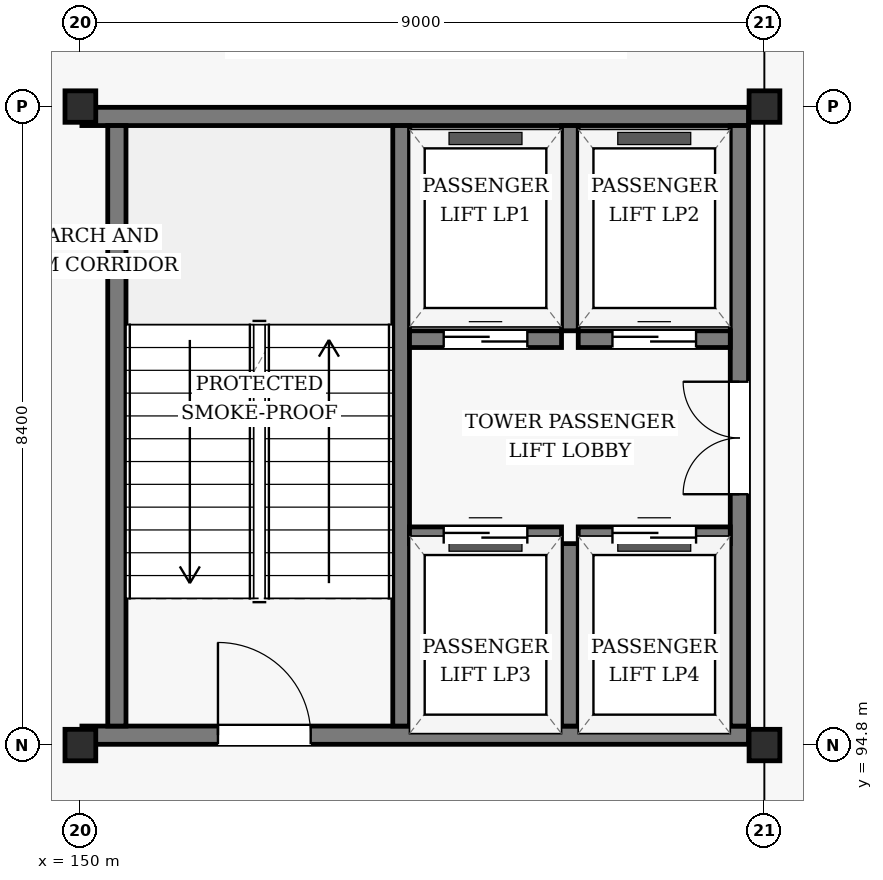
"""IFC4 building model, lengths in metres.
Left out: names, types, materials, properties, quantities, classifications, styles, units other than length and angle.
Written with IfcOpenShell. Run it as: python <this file> out.ifc"""

import sys

from ifc_helpers import new_model, si_unit, direction, frame, frame_2d, origin, origin_2d, place, context, subcontext, project, spatial, rectangle, i_section, extrude, element, fill, save


model = new_model("IFC4")
c1 = context("Model", 3, precision=1e-05, world=origin(), true_north=direction((0.0, 1.0)))
c2 = subcontext(c1, "Body", "Model", "MODEL_VIEW")
j1 = project(units=[si_unit("LENGTHUNIT", "METRE"), si_unit("PLANEANGLEUNIT", "RADIAN")], contexts=[c1])
p1 = place(None, origin())
s1 = spatial("IfcSite", under=j1, at=p1, CompositionType="ELEMENT")
p2 = place(p1, origin())
s2 = spatial("IfcBuilding", under=s1, at=p2, CompositionType="ELEMENT")
p3 = place(p2, frame((0.0, 0.0, 17.1)))
s3 = spatial("IfcBuildingStorey", under=s2, at=p3, CompositionType="ELEMENT", Elevation=17.1)
for number, where, z_axis, x_axis in (
    (1, (150.0, 94.8, 0.0), (0.0, 0.0, 1.0), (1.0, 0.0, 0.0)),
    (2, (150.0, 103.2, 0.0), (0.0, 0.0, 1.0), (1.0, 0.0, 0.0)),
    (3, (159.0, 94.8, 0.0), (0.0, 0.0, 1.0), (1.0, 0.0, 0.0)),
    (4, (159.0, 103.2, 0.0), (0.0, 0.0, 1.0), (1.0, 0.0, 0.0)),
):
    element("IfcColumn", number, at=place(p3, frame(where, z_axis=z_axis, x_axis=x_axis)), inside=s3, PredefinedType="COLUMN", context=c2, shape_type="SweptSolid", body=[
        extrude(i_section(OverallWidth=0.405, OverallDepth=0.414, WebThickness=0.018, FlangeThickness=0.028, FilletRadius=0.022, at=origin_2d()), origin(), (0.0, 0.0, 1.0), 3.9),
    ])
p4 = place(p3, frame((150.02, 94.93, 0.0), z_axis=(0.0, 0.0, 1.0), x_axis=(1.0, 0.0, 0.0)))
e5 = element("IfcWall", 5, at=p4, inside=s3, PredefinedType="SHEAR", context=c2, shape_type="SweptSolid", body=[
    extrude(rectangle(XDim=8.77, YDim=0.24, at=frame_2d((4.385, 0.0))), origin(), (0.0, 0.0, 1.0), 3.6),
])
p5 = place(p4, frame((1.79, 0.0, 0.0)))
e6 = element("IfcOpeningElement", 6, at=p5, cuts=e5, PredefinedType="OPENING", context=c2, shape_type="SweptSolid", body=[
    extrude(rectangle(XDim=1.22, YDim=2.18, at=frame_2d((0.61, 1.09))), frame((0.0, 0.13, 0.0), z_axis=(0.0, -1.0, 0.0), x_axis=(1.0, 0.0, 0.0)), (0.0, 0.0, 1.0), 0.26),
])
p6 = place(p3, frame((150.02, 103.07, 0.0), z_axis=(0.0, 0.0, 1.0), x_axis=(1.0, 0.0, 0.0)))
e7 = element("IfcWall", 7, at=p6, inside=s3, PredefinedType="SHEAR", context=c2, shape_type="SweptSolid", body=[
    extrude(rectangle(XDim=8.77, YDim=0.24, at=frame_2d((4.385, 0.0))), origin(), (0.0, 0.0, 1.0), 3.6),
])
p7 = place(p3, frame((150.48, 95.05, 0.0), z_axis=(0.0, 0.0, 1.0), x_axis=(0.0, 1.0, 0.0)))
e8 = element("IfcWall", 8, at=p7, inside=s3, PredefinedType="SHEAR", context=c2, shape_type="SweptSolid", body=[
    extrude(rectangle(XDim=7.9, YDim=0.24, at=frame_2d((3.95, 0.0))), origin(), (0.0, 0.0, 1.0), 3.6),
])
p8 = place(p3, frame((154.22, 95.05, 0.0), z_axis=(0.0, 0.0, 1.0), x_axis=(0.0, 1.0, 0.0)))
e9 = element("IfcWall", 9, at=p8, inside=s3, PredefinedType="SHEAR", context=c2, shape_type="SweptSolid", body=[
    extrude(rectangle(XDim=7.9, YDim=0.22, at=frame_2d((3.95, 0.0))), origin(), (0.0, 0.0, 1.0), 3.6),
])
p9 = place(p3, frame((158.67, 95.05, 0.0), z_axis=(0.0, 0.0, 1.0), x_axis=(0.0, 1.0, 0.0)))
e10 = element("IfcWall", 10, at=p9, inside=s3, PredefinedType="SHEAR", context=c2, shape_type="SweptSolid", body=[
    extrude(rectangle(XDim=7.9, YDim=0.24, at=frame_2d((3.95, 0.0))), origin(), (0.0, 0.0, 1.0), 3.6),
])
p10 = place(p9, frame((3.05, 0.0, 0.0)))
e11 = element("IfcOpeningElement", 11, at=p10, cuts=e10, PredefinedType="OPENING", context=c2, shape_type="SweptSolid", body=[
    extrude(rectangle(XDim=1.48, YDim=2.22, at=frame_2d((0.74, 1.11))), frame((0.0, 0.13, 0.0), z_axis=(0.0, -1.0, 0.0), x_axis=(1.0, 0.0, 0.0)), (0.0, 0.0, 1.0), 0.26),
])
p11 = place(p3, frame((156.44, 100.25, 0.0), z_axis=(0.0, 0.0, 1.0), x_axis=(0.0, 1.0, 0.0)))
e12 = element("IfcWall", 12, at=p11, inside=s3, PredefinedType="SHEAR", context=c2, shape_type="SweptSolid", body=[
    extrude(rectangle(XDim=2.7, YDim=0.22, at=frame_2d((1.35, 0.0))), origin(), (0.0, 0.0, 1.0), 3.6),
])
p12 = place(p3, frame((154.33, 100.14, 0.0), z_axis=(0.0, 0.0, 1.0), x_axis=(1.0, 0.0, 0.0)))
e13 = element("IfcWall", 13, at=p12, inside=s3, PredefinedType="SHEAR", context=c2, shape_type="SweptSolid", body=[
    extrude(rectangle(XDim=2.0, YDim=0.22, at=frame_2d((1.0, 0.0))), origin(), (0.0, 0.0, 1.0), 3.6),
])
p13 = place(p12, frame((0.45, 0.0, 0.0)))
e14 = element("IfcOpeningElement", 14, at=p13, cuts=e13, PredefinedType="OPENING", context=c2, shape_type="SweptSolid", body=[
    extrude(rectangle(XDim=1.1, YDim=2.15, at=frame_2d((0.55, 1.075))), frame((0.0, 0.12, 0.0), z_axis=(0.0, -1.0, 0.0), x_axis=(1.0, 0.0, 0.0)), (0.0, 0.0, 1.0), 0.24),
])
p14 = place(p3, frame((156.55, 100.14, 0.0), z_axis=(0.0, 0.0, 1.0), x_axis=(1.0, 0.0, 0.0)))
e15 = element("IfcWall", 15, at=p14, inside=s3, PredefinedType="SHEAR", context=c2, shape_type="SweptSolid", body=[
    extrude(rectangle(XDim=2.0, YDim=0.22, at=frame_2d((1.0, 0.0))), origin(), (0.0, 0.0, 1.0), 3.6),
])
p15 = place(p14, frame((0.45, 0.0, 0.0)))
e16 = element("IfcOpeningElement", 16, at=p15, cuts=e15, PredefinedType="OPENING", context=c2, shape_type="SweptSolid", body=[
    extrude(rectangle(XDim=1.1, YDim=2.15, at=frame_2d((0.55, 1.075))), frame((0.0, 0.12, 0.0), z_axis=(0.0, -1.0, 0.0), x_axis=(1.0, 0.0, 0.0)), (0.0, 0.0, 1.0), 0.24),
])
p16 = place(p3, frame((156.44, 95.05, 0.0), z_axis=(0.0, 0.0, 1.0), x_axis=(0.0, 1.0, 0.0)))
e17 = element("IfcWall", 17, at=p16, inside=s3, PredefinedType="SHEAR", context=c2, shape_type="SweptSolid", body=[
    extrude(rectangle(XDim=2.4, YDim=0.22, at=frame_2d((1.2, 0.0))), origin(), (0.0, 0.0, 1.0), 3.6),
])
p17 = place(p3, frame((154.33, 97.56, 0.0), z_axis=(0.0, 0.0, 1.0), x_axis=(1.0, 0.0, 0.0)))
e18 = element("IfcWall", 18, at=p17, inside=s3, PredefinedType="SHEAR", context=c2, shape_type="SweptSolid", body=[
    extrude(rectangle(XDim=2.0, YDim=0.22, at=frame_2d((1.0, 0.0))), origin(), (0.0, 0.0, 1.0), 3.6),
])
p18 = place(p17, frame((0.45, 0.0, 0.0)))
e19 = element("IfcOpeningElement", 19, at=p18, cuts=e18, PredefinedType="OPENING", context=c2, shape_type="SweptSolid", body=[
    extrude(rectangle(XDim=1.1, YDim=2.15, at=frame_2d((0.55, 1.075))), frame((0.0, 0.12, 0.0), z_axis=(0.0, -1.0, 0.0), x_axis=(1.0, 0.0, 0.0)), (0.0, 0.0, 1.0), 0.24),
])
p19 = place(p3, frame((156.55, 97.56, 0.0), z_axis=(0.0, 0.0, 1.0), x_axis=(1.0, 0.0, 0.0)))
e20 = element("IfcWall", 20, at=p19, inside=s3, PredefinedType="SHEAR", context=c2, shape_type="SweptSolid", body=[
    extrude(rectangle(XDim=2.0, YDim=0.22, at=frame_2d((1.0, 0.0))), origin(), (0.0, 0.0, 1.0), 3.6),
])
p20 = place(p19, frame((0.45, 0.0, 0.0)))
e21 = element("IfcOpeningElement", 21, at=p20, cuts=e20, PredefinedType="OPENING", context=c2, shape_type="SweptSolid", body=[
    extrude(rectangle(XDim=1.1, YDim=2.15, at=frame_2d((0.55, 1.075))), frame((0.0, 0.12, 0.0), z_axis=(0.0, -1.0, 0.0), x_axis=(1.0, 0.0, 0.0)), (0.0, 0.0, 1.0), 0.24),
])
p21 = place(p5, origin())
e22 = element("IfcDoor", 22, at=p21, inside=s3, OperationType="SINGLE_SWING_LEFT", PredefinedType="DOOR", context=c2, shape_type="SweptSolid", body=[
    extrude(rectangle(XDim=1.22, YDim=2.18, at=frame_2d((0.61, 1.09))), frame((0.0, 0.025, 0.0), z_axis=(0.0, -1.0, 0.0), x_axis=(1.0, 0.0, 0.0)), (0.0, 0.0, 1.0), 0.05),
])
fill(e6, e22)
p22 = place(p10, origin())
e23 = element("IfcDoor", 23, at=p22, inside=s3, OperationType="DOUBLE_DOOR_SINGLE_SWING", PredefinedType="DOOR", context=c2, shape_type="SweptSolid", body=[
    extrude(rectangle(XDim=1.48, YDim=2.22, at=frame_2d((0.74, 1.11))), frame((0.0, 0.025, 0.0), z_axis=(0.0, -1.0, 0.0), x_axis=(1.0, 0.0, 0.0)), (0.0, 0.0, 1.0), 0.05),
])
fill(e11, e23)
p23 = place(p13, origin())
e24 = element("IfcDoor", 24, at=p23, inside=s3, OperationType="SLIDING_TO_LEFT", PredefinedType="DOOR", context=c2, shape_type="SweptSolid", body=[
    extrude(rectangle(XDim=1.1, YDim=2.15, at=frame_2d((0.55, 1.075))), frame((0.0, 0.025, 0.0), z_axis=(0.0, -1.0, 0.0), x_axis=(1.0, 0.0, 0.0)), (0.0, 0.0, 1.0), 0.05),
])
fill(e14, e24)
p24 = place(p15, origin())
e25 = element("IfcDoor", 25, at=p24, inside=s3, OperationType="SLIDING_TO_LEFT", PredefinedType="DOOR", context=c2, shape_type="SweptSolid", body=[
    extrude(rectangle(XDim=1.1, YDim=2.15, at=frame_2d((0.55, 1.075))), frame((0.0, 0.025, 0.0), z_axis=(0.0, -1.0, 0.0), x_axis=(1.0, 0.0, 0.0)), (0.0, 0.0, 1.0), 0.05),
])
fill(e16, e25)
p25 = place(p18, origin())
e26 = element("IfcDoor", 26, at=p25, inside=s3, OperationType="SLIDING_TO_LEFT", PredefinedType="DOOR", context=c2, shape_type="SweptSolid", body=[
    extrude(rectangle(XDim=1.1, YDim=2.15, at=frame_2d((0.55, 1.075))), frame((0.0, 0.025, 0.0), z_axis=(0.0, -1.0, 0.0), x_axis=(1.0, 0.0, 0.0)), (0.0, 0.0, 1.0), 0.05),
])
fill(e19, e26)
p26 = place(p20, origin())
e27 = element("IfcDoor", 27, at=p26, inside=s3, OperationType="SLIDING_TO_LEFT", PredefinedType="DOOR", context=c2, shape_type="SweptSolid", body=[
    extrude(rectangle(XDim=1.1, YDim=2.15, at=frame_2d((0.55, 1.075))), frame((0.0, 0.025, 0.0), z_axis=(0.0, -1.0, 0.0), x_axis=(1.0, 0.0, 0.0)), (0.0, 0.0, 1.0), 0.05),
])
fill(e21, e27)
save(model, sys.argv[1])
